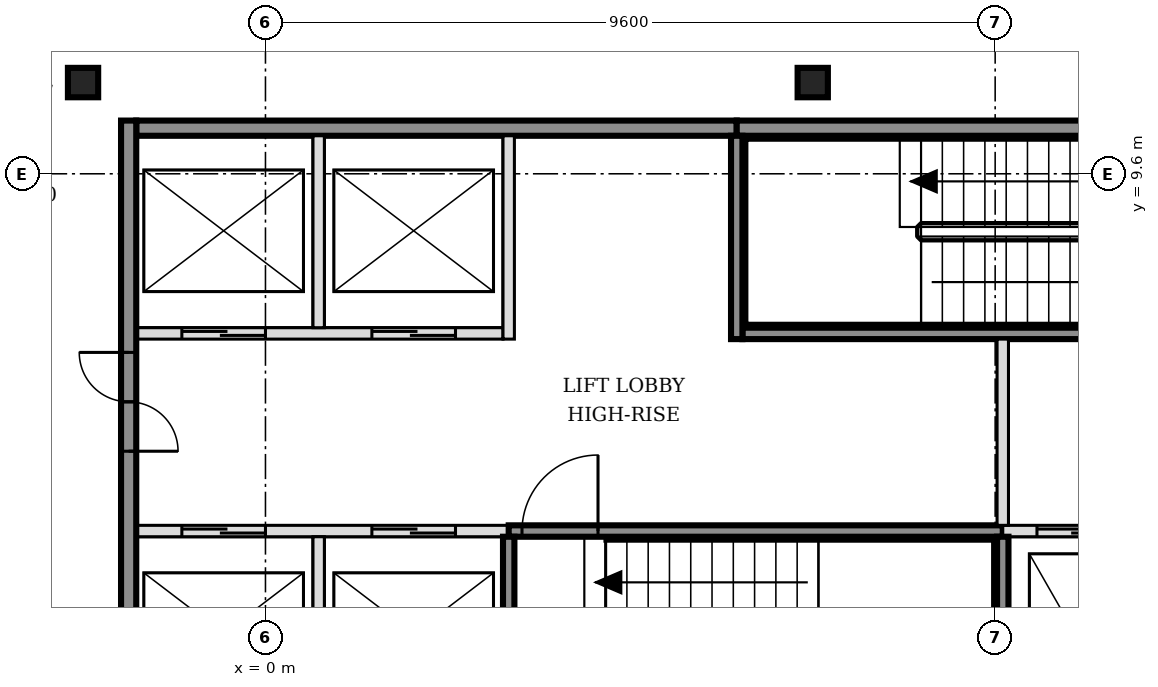
"""IFC4 building model, lengths in metres.
Left out: names, types, materials, properties, quantities, classifications, styles, units other than length and angle.
Written with IfcOpenShell. Run it as: python <this file> out.ifc"""

import sys

from ifc_helpers import new_model, si_unit, direction, frame, frame_2d, origin, origin_2d, place, context, subcontext, project, spatial, rectangle, i_section, extrude, element, fill, save


model = new_model("IFC4")
c1 = context("Model", 3, precision=1e-05, world=origin(), true_north=direction((0.0, 1.0)))
c2 = subcontext(c1, "Body", "Model", "MODEL_VIEW")
j1 = project(units=[si_unit("LENGTHUNIT", "METRE"), si_unit("PLANEANGLEUNIT", "RADIAN")], contexts=[c1])
p1 = place(None, origin())
s1 = spatial("IfcSite", under=j1, at=p1, CompositionType="ELEMENT")
p2 = place(p1, origin())
s2 = spatial("IfcBuilding", under=s1, at=p2, CompositionType="ELEMENT")
p3 = place(p2, frame((0.0, 0.0, 281.4)))
s3 = spatial("IfcBuildingStorey", under=s2, at=p3, CompositionType="ELEMENT", Elevation=281.4)
for number, where, z_axis, x_axis in (
    (1, (-2.4, 10.8, -0.15), (0.0, 0.0, 1.0), (1.0, 0.0, 0.0)),
    (2, (7.2, 10.8, -0.15), (0.0, 0.0, 1.0), (1.0, 0.0, 0.0)),
):
    element("IfcColumn", number, at=place(p3, frame(where, z_axis=z_axis, x_axis=x_axis)), inside=s3, PredefinedType="COLUMN", context=c2, shape_type="SweptSolid", body=[
        extrude(i_section(OverallWidth=0.398, OverallDepth=0.387, WebThickness=0.021, FlangeThickness=0.033, FilletRadius=0.015, at=origin_2d()), origin(), (0.0, 0.0, 1.0), 3.6),
    ])
p4 = place(p3, frame((-1.7, 4.9, 0.0), z_axis=(0.0, 0.0, 1.0), x_axis=(1.0, 0.0, 0.0)))
e3 = element("IfcWall", 3, at=p4, inside=s3, PredefinedType="SOLIDWALL", context=c2, shape_type="SweptSolid", body=[
    extrude(rectangle(XDim=4.9, YDim=0.15, at=frame_2d((2.45, 0.0))), origin(), (0.0, 0.0, 1.0), 3.45),
])
p5 = place(p4, frame((0.6, 0.0, 0.0)))
e4 = element("IfcOpeningElement", 4, at=p5, cuts=e3, PredefinedType="OPENING", context=c2, shape_type="SweptSolid", body=[
    extrude(rectangle(XDim=1.1, YDim=2.1, at=frame_2d((0.55, 1.05))), frame((0.0, 0.085, 0.0), z_axis=(0.0, -1.0, 0.0), x_axis=(1.0, 0.0, 0.0)), (0.0, 0.0, 1.0), 0.17),
])
p6 = place(p4, frame((3.1, 0.0, 0.0)))
e5 = element("IfcOpeningElement", 5, at=p6, cuts=e3, PredefinedType="OPENING", context=c2, shape_type="SweptSolid", body=[
    extrude(rectangle(XDim=1.1, YDim=2.1, at=frame_2d((0.55, 1.05))), frame((0.0, 0.085, 0.0), z_axis=(0.0, -1.0, 0.0), x_axis=(1.0, 0.0, 0.0)), (0.0, 0.0, 1.0), 0.17),
])
p7 = place(p3, frame((3.2, 4.9, 0.0), z_axis=(0.0, 0.0, 1.0), x_axis=(1.0, 0.0, 0.0)))
e6 = element("IfcWall", 6, at=p7, inside=s3, PredefinedType="SOLIDWALL", context=c2, shape_type="SweptSolid", body=[
    extrude(rectangle(XDim=6.5, YDim=0.15, at=frame_2d((3.25, 0.0))), origin(), (0.0, 0.0, 1.0), 3.45),
])
p8 = place(p7, frame((0.175, 0.0, 0.0)))
e7 = element("IfcOpeningElement", 7, at=p8, cuts=e6, PredefinedType="OPENING", context=c2, shape_type="SweptSolid", body=[
    extrude(rectangle(XDim=1.0, YDim=2.1, at=frame_2d((0.5, 1.05))), frame((0.0, 0.085, 0.0), z_axis=(0.0, -1.0, 0.0), x_axis=(1.0, 0.0, 0.0)), (0.0, 0.0, 1.0), 0.17),
])
p9 = place(p3, frame((9.7, 4.9, 0.0), z_axis=(0.0, 0.0, 1.0), x_axis=(1.0, 0.0, 0.0)))
e8 = element("IfcWall", 8, at=p9, inside=s3, PredefinedType="SOLIDWALL", context=c2, shape_type="SweptSolid", body=[
    extrude(rectangle(XDim=6.4, YDim=0.15, at=frame_2d((3.2, 0.0))), origin(), (0.0, 0.0, 1.0), 3.45),
])
p10 = place(p9, frame((0.45, 0.0, 0.0)))
e9 = element("IfcOpeningElement", 9, at=p10, cuts=e8, PredefinedType="OPENING", context=c2, shape_type="SweptSolid", body=[
    extrude(rectangle(XDim=1.0, YDim=2.1, at=frame_2d((0.5, 1.05))), frame((0.0, 0.085, 0.0), z_axis=(0.0, -1.0, 0.0), x_axis=(1.0, 0.0, 0.0)), (0.0, 0.0, 1.0), 0.17),
])
p11 = place(p9, frame((2.35, 0.0, 0.0)))
e10 = element("IfcOpeningElement", 10, at=p11, cuts=e8, PredefinedType="OPENING", context=c2, shape_type="SweptSolid", body=[
    extrude(rectangle(XDim=1.0, YDim=2.1, at=frame_2d((0.5, 1.05))), frame((0.0, 0.085, 0.0), z_axis=(0.0, -1.0, 0.0), x_axis=(1.0, 0.0, 0.0)), (0.0, 0.0, 1.0), 0.17),
])
p12 = place(p9, frame((4.7, 0.0, 0.0)))
e11 = element("IfcOpeningElement", 11, at=p12, cuts=e8, PredefinedType="OPENING", context=c2, shape_type="SweptSolid", body=[
    extrude(rectangle(XDim=0.9, YDim=2.1, at=frame_2d((0.45, 1.05))), frame((0.0, 0.085, 0.0), z_axis=(0.0, -1.0, 0.0), x_axis=(1.0, 0.0, 0.0)), (0.0, 0.0, 1.0), 0.17),
])
p13 = place(p3, frame((-1.7, 7.5, 0.0), z_axis=(0.0, 0.0, 1.0), x_axis=(1.0, 0.0, 0.0)))
e12 = element("IfcWall", 12, at=p13, inside=s3, PredefinedType="SOLIDWALL", context=c2, shape_type="SweptSolid", body=[
    extrude(rectangle(XDim=4.825, YDim=0.15, at=frame_2d((2.413, 0.0))), origin(), (0.0, 0.0, 1.0), 3.45),
])
p14 = place(p13, frame((0.6, 0.0, 0.0)))
e13 = element("IfcOpeningElement", 13, at=p14, cuts=e12, PredefinedType="OPENING", context=c2, shape_type="SweptSolid", body=[
    extrude(rectangle(XDim=1.1, YDim=2.1, at=frame_2d((0.55, 1.05))), frame((0.0, 0.085, 0.0), z_axis=(0.0, -1.0, 0.0), x_axis=(1.0, 0.0, 0.0)), (0.0, 0.0, 1.0), 0.17),
])
p15 = place(p13, frame((3.1, 0.0, 0.0)))
e14 = element("IfcOpeningElement", 14, at=p15, cuts=e12, PredefinedType="OPENING", context=c2, shape_type="SweptSolid", body=[
    extrude(rectangle(XDim=1.1, YDim=2.1, at=frame_2d((0.55, 1.05))), frame((0.0, 0.085, 0.0), z_axis=(0.0, -1.0, 0.0), x_axis=(1.0, 0.0, 0.0)), (0.0, 0.0, 1.0), 0.17),
])
p16 = place(p3, frame((6.275, 7.5, 0.0), z_axis=(0.0, 0.0, 1.0), x_axis=(1.0, 0.0, 0.0)))
e15 = element("IfcWall", 15, at=p16, inside=s3, PredefinedType="SOLIDWALL", context=c2, shape_type="SweptSolid", body=[
    extrude(rectangle(XDim=6.425, YDim=0.15, at=frame_2d((3.212, 0.0))), origin(), (0.0, 0.0, 1.0), 3.45),
])
p17 = place(p16, frame((5.225, 0.0, 0.0)))
e16 = element("IfcOpeningElement", 16, at=p17, cuts=e15, PredefinedType="OPENING", context=c2, shape_type="SweptSolid", body=[
    extrude(rectangle(XDim=1.0, YDim=2.1, at=frame_2d((0.5, 1.05))), frame((0.0, 0.085, 0.0), z_axis=(0.0, -1.0, 0.0), x_axis=(1.0, 0.0, 0.0)), (0.0, 0.0, 1.0), 0.17),
])
p18 = place(p3, frame((-1.7, 10.2, 0.0), z_axis=(0.0, 0.0, 1.0), x_axis=(1.0, 0.0, 0.0)))
e17 = element("IfcWall", 17, at=p18, inside=s3, PredefinedType="SOLIDWALL", context=c2, shape_type="SweptSolid", body=[
    extrude(rectangle(XDim=7.9, YDim=0.2, at=frame_2d((3.95, 0.0))), origin(), (0.0, 0.0, 1.0), 3.45),
])
p19 = place(p3, frame((6.2, 10.2, 0.0), z_axis=(0.0, 0.0, 1.0), x_axis=(1.0, 0.0, 0.0)))
e18 = element("IfcWall", 18, at=p19, inside=s3, PredefinedType="SOLIDWALL", context=c2, shape_type="SweptSolid", body=[
    extrude(rectangle(XDim=6.5, YDim=0.2, at=frame_2d((3.25, 0.0))), origin(), (0.0, 0.0, 1.0), 3.45),
])
p20 = place(p3, frame((-1.8, -5.5, 0.0), z_axis=(0.0, 0.0, 1.0), x_axis=(0.0, 1.0, 0.0)))
e19 = element("IfcWall", 19, at=p20, inside=s3, PredefinedType="SOLIDWALL", context=c2, shape_type="SweptSolid", body=[
    extrude(rectangle(XDim=15.8, YDim=0.2, at=frame_2d((7.9, 0.0))), origin(), (0.0, 0.0, 1.0), 3.45),
])
p21 = place(p20, frame((3.05, 0.0, 0.0)))
e20 = element("IfcOpeningElement", 20, at=p21, cuts=e19, PredefinedType="OPENING", context=c2, shape_type="SweptSolid", body=[
    extrude(rectangle(XDim=1.3, YDim=2.1, at=frame_2d((0.65, 1.05))), frame((0.0, 0.11, 0.0), z_axis=(0.0, -1.0, 0.0), x_axis=(1.0, 0.0, 0.0)), (0.0, 0.0, 1.0), 0.22),
])
p22 = place(p20, frame((11.45, 0.0, 0.0)))
e21 = element("IfcOpeningElement", 21, at=p22, cuts=e19, PredefinedType="OPENING", context=c2, shape_type="SweptSolid", body=[
    extrude(rectangle(XDim=1.3, YDim=2.1, at=frame_2d((0.65, 1.05))), frame((0.0, 0.11, 0.0), z_axis=(0.0, -1.0, 0.0), x_axis=(1.0, 0.0, 0.0)), (0.0, 0.0, 1.0), 0.22),
])
p23 = place(p3, frame((0.7, 2.275, 0.0), z_axis=(0.0, 0.0, 1.0), x_axis=(0.0, 1.0, 0.0)))
e22 = element("IfcWall", 22, at=p23, inside=s3, PredefinedType="SOLIDWALL", context=c2, shape_type="SweptSolid", body=[
    extrude(rectangle(XDim=2.55, YDim=0.15, at=frame_2d((1.275, 0.0))), origin(), (0.0, 0.0, 1.0), 3.45),
])
p24 = place(p3, frame((0.7, 7.575, 0.0), z_axis=(0.0, 0.0, 1.0), x_axis=(0.0, 1.0, 0.0)))
e23 = element("IfcWall", 23, at=p24, inside=s3, PredefinedType="SOLIDWALL", context=c2, shape_type="SweptSolid", body=[
    extrude(rectangle(XDim=2.525, YDim=0.15, at=frame_2d((1.263, 0.0))), origin(), (0.0, 0.0, 1.0), 3.45),
])
p25 = place(p3, frame((3.2, 2.275, 0.0), z_axis=(0.0, 0.0, 1.0), x_axis=(0.0, 1.0, 0.0)))
e24 = element("IfcWall", 24, at=p25, inside=s3, PredefinedType="SOLIDWALL", context=c2, shape_type="SweptSolid", body=[
    extrude(rectangle(XDim=2.55, YDim=0.15, at=frame_2d((1.275, 0.0))), origin(), (0.0, 0.0, 1.0), 3.45),
])
for number, where, z_axis, x_axis in (
    (25, (3.2, 7.425, 0.0), (0.0, 0.0, 1.0), (0.0, 1.0, 0.0)),
    (26, (6.2, 7.425, 0.0), (0.0, 0.0, 1.0), (0.0, 1.0, 0.0)),
):
    element("IfcWall", number, at=place(p3, frame(where, z_axis=z_axis, x_axis=x_axis)), inside=s3, PredefinedType="SOLIDWALL", context=c2, shape_type="SweptSolid", body=[
        extrude(rectangle(XDim=2.675, YDim=0.15, at=frame_2d((1.337, 0.0))), origin(), (0.0, 0.0, 1.0), 3.45),
    ])
p26 = place(p3, frame((9.7, 2.275, 0.0), z_axis=(0.0, 0.0, 1.0), x_axis=(0.0, 1.0, 0.0)))
e27 = element("IfcWall", 27, at=p26, inside=s3, PredefinedType="SOLIDWALL", context=c2, shape_type="SweptSolid", body=[
    extrude(rectangle(XDim=2.55, YDim=0.15, at=frame_2d((1.275, 0.0))), origin(), (0.0, 0.0, 1.0), 3.45),
])
p27 = place(p3, frame((9.7, 4.975, 0.0), z_axis=(0.0, 0.0, 1.0), x_axis=(0.0, 1.0, 0.0)))
e28 = element("IfcWall", 28, at=p27, inside=s3, PredefinedType="SOLIDWALL", context=c2, shape_type="SweptSolid", body=[
    extrude(rectangle(XDim=2.45, YDim=0.15, at=frame_2d((1.225, 0.0))), origin(), (0.0, 0.0, 1.0), 3.45),
])
p28 = place(p5, origin())
e29 = element("IfcDoor", 29, at=p28, inside=s3, OperationType="DOUBLE_DOOR_SLIDING", PredefinedType="DOOR", context=c2, shape_type="SweptSolid", body=[
    extrude(rectangle(XDim=1.1, YDim=2.1, at=frame_2d((0.55, 1.05))), frame((0.0, 0.025, 0.0), z_axis=(0.0, -1.0, 0.0), x_axis=(1.0, 0.0, 0.0)), (0.0, 0.0, 1.0), 0.05),
])
fill(e4, e29)
p29 = place(p6, origin())
e30 = element("IfcDoor", 30, at=p29, inside=s3, OperationType="DOUBLE_DOOR_SLIDING", PredefinedType="DOOR", context=c2, shape_type="SweptSolid", body=[
    extrude(rectangle(XDim=1.1, YDim=2.1, at=frame_2d((0.55, 1.05))), frame((0.0, 0.025, 0.0), z_axis=(0.0, -1.0, 0.0), x_axis=(1.0, 0.0, 0.0)), (0.0, 0.0, 1.0), 0.05),
])
fill(e5, e30)
p30 = place(p14, origin())
e31 = element("IfcDoor", 31, at=p30, inside=s3, OperationType="DOUBLE_DOOR_SLIDING", PredefinedType="DOOR", context=c2, shape_type="SweptSolid", body=[
    extrude(rectangle(XDim=1.1, YDim=2.1, at=frame_2d((0.55, 1.05))), frame((0.0, 0.025, 0.0), z_axis=(0.0, -1.0, 0.0), x_axis=(1.0, 0.0, 0.0)), (0.0, 0.0, 1.0), 0.05),
])
fill(e13, e31)
p31 = place(p15, origin())
e32 = element("IfcDoor", 32, at=p31, inside=s3, OperationType="DOUBLE_DOOR_SLIDING", PredefinedType="DOOR", context=c2, shape_type="SweptSolid", body=[
    extrude(rectangle(XDim=1.1, YDim=2.1, at=frame_2d((0.55, 1.05))), frame((0.0, 0.025, 0.0), z_axis=(0.0, -1.0, 0.0), x_axis=(1.0, 0.0, 0.0)), (0.0, 0.0, 1.0), 0.05),
])
fill(e14, e32)
p32 = place(p10, origin())
e33 = element("IfcDoor", 33, at=p32, inside=s3, OperationType="DOUBLE_DOOR_SLIDING", PredefinedType="DOOR", context=c2, shape_type="SweptSolid", body=[
    extrude(rectangle(XDim=1.0, YDim=2.1, at=frame_2d((0.5, 1.05))), frame((0.0, 0.025, 0.0), z_axis=(0.0, -1.0, 0.0), x_axis=(1.0, 0.0, 0.0)), (0.0, 0.0, 1.0), 0.05),
])
fill(e9, e33)
p33 = place(p8, origin())
e34 = element("IfcDoor", 34, at=p33, inside=s3, OperationType="SINGLE_SWING_RIGHT", PredefinedType="DOOR", context=c2, shape_type="SweptSolid", body=[
    extrude(rectangle(XDim=1.0, YDim=2.1, at=frame_2d((0.5, 1.05))), frame((0.0, 0.025, 0.0), z_axis=(0.0, -1.0, 0.0), x_axis=(1.0, 0.0, 0.0)), (0.0, 0.0, 1.0), 0.05),
])
fill(e7, e34)
p34 = place(p22, origin())
e35 = element("IfcDoor", 35, at=p34, inside=s3, OperationType="DOUBLE_DOOR_SINGLE_SWING", PredefinedType="DOOR", context=c2, shape_type="SweptSolid", body=[
    extrude(rectangle(XDim=1.3, YDim=2.1, at=frame_2d((0.65, 1.05))), frame((0.0, 0.025, 0.0), z_axis=(0.0, -1.0, 0.0), x_axis=(1.0, 0.0, 0.0)), (0.0, 0.0, 1.0), 0.05),
])
fill(e21, e35)
save(model, sys.argv[1])
